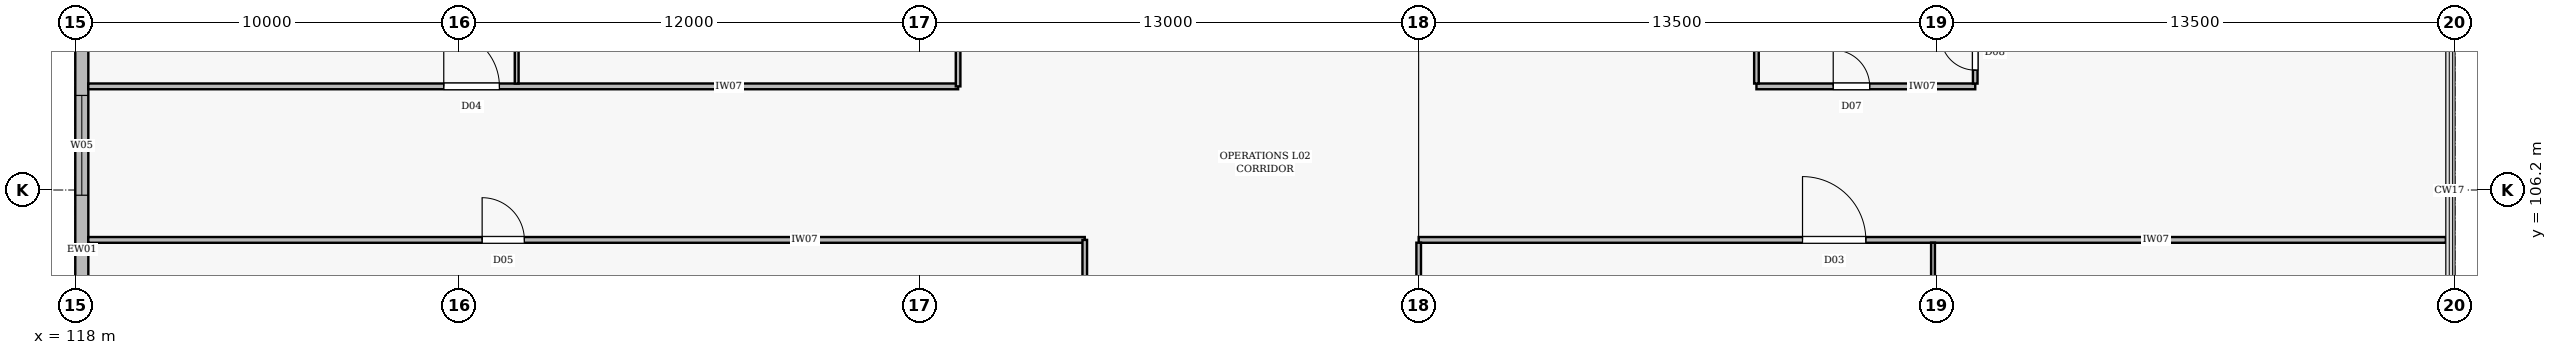
"""IFC4 building model, lengths in metres.
Left out: names, types, materials, properties, quantities, classifications, styles, units other than length and angle.
Written with IfcOpenShell. Run it as: python <this file> out.ifc"""

import sys

from ifc_helpers import new_model, si_unit, direction, frame, frame_2d, origin, place, context, subcontext, project, spatial, rectangle, extrude, element, fill, save


model = new_model("IFC4")
c1 = context("Model", 3, precision=1e-05, world=origin(), true_north=direction((0.0, 1.0)))
c2 = subcontext(c1, "Body", "Model", "MODEL_VIEW")
j1 = project(units=[si_unit("LENGTHUNIT", "METRE"), si_unit("PLANEANGLEUNIT", "RADIAN")], contexts=[c1])
p1 = place(None, origin())
s1 = spatial("IfcSite", under=j1, at=p1, CompositionType="ELEMENT")
p2 = place(p1, origin())
s2 = spatial("IfcBuilding", under=s1, at=p2, CompositionType="ELEMENT")
p3 = place(p2, frame((0.0, 0.0, 12.6)))
s3 = spatial("IfcBuildingStorey", under=s2, at=p3, CompositionType="ELEMENT", Elevation=12.6)
p4 = place(p3, frame((118.17, 101.073, 0.0), z_axis=(0.0, 0.0, 1.0), x_axis=(0.0, 1.0, 0.0)))
e1 = element("IfcWall", 1, at=p4, inside=s3, PredefinedType="STANDARD", context=c2, shape_type="SweptSolid", body=[
    extrude(rectangle(XDim=10.254, YDim=0.34, at=frame_2d((5.127, 0.0))), origin(), (0.0, 0.0, 1.0), 3.9),
])
p5 = place(p4, frame((0.964, 0.0, 0.75)))
e2 = element("IfcOpeningElement", 2, at=p5, cuts=e1, PredefinedType="OPENING", context=c2, shape_type="SweptSolid", body=[
    extrude(rectangle(XDim=1.2, YDim=1.8, at=frame_2d((0.6, 0.9))), frame((0.0, 0.182, 0.0), z_axis=(0.0, -1.0, 0.0), x_axis=(1.0, 0.0, 0.0)), (0.0, 0.0, 1.0), 0.364),
])
p6 = place(p4, frame((4.991, 0.0, 0.75)))
e3 = element("IfcOpeningElement", 3, at=p6, cuts=e1, PredefinedType="OPENING", context=c2, shape_type="SweptSolid", body=[
    extrude(rectangle(XDim=2.6, YDim=2.4, at=frame_2d((1.3, 1.2))), frame((0.0, 0.182, 0.0), z_axis=(0.0, -1.0, 0.0), x_axis=(1.0, 0.0, 0.0)), (0.0, 0.0, 1.0), 0.364),
])
p7 = place(p3, frame((118.338, 104.9, 0.0), z_axis=(0.0, 0.0, 1.0), x_axis=(1.0, 0.0, 0.0)))
e4 = element("IfcWall", 4, at=p7, inside=s3, PredefinedType="PARTITIONING", context=c2, shape_type="SweptSolid", body=[
    extrude(rectangle(XDim=25.962, YDim=0.15, at=frame_2d((12.981, 0.0))), origin(), (0.0, 0.0, 1.0), 4.09),
])
p8 = place(p7, frame((10.262, 0.0, 0.005)))
e5 = element("IfcOpeningElement", 5, at=p8, cuts=e4, PredefinedType="OPENING", context=c2, shape_type="SweptSolid", body=[
    extrude(rectangle(XDim=1.1, YDim=2.1, at=frame_2d((0.55, 1.05))), frame((0.0, 0.087, 0.0), z_axis=(0.0, -1.0, 0.0), x_axis=(1.0, 0.0, 0.0)), (0.0, 0.0, 1.0), 0.174),
])
p9 = place(p3, frame((153.0, 104.9, 0.0), z_axis=(0.0, 0.0, 1.0), x_axis=(1.0, 0.0, 0.0)))
e6 = element("IfcWall", 6, at=p9, inside=s3, PredefinedType="PARTITIONING", context=c2, shape_type="SweptSolid", body=[
    extrude(rectangle(XDim=26.762, YDim=0.15, at=frame_2d((13.381, 0.0))), origin(), (0.0, 0.0, 1.0), 4.09),
])
p10 = place(p9, frame((10.0, 0.0, 0.005)))
e7 = element("IfcOpeningElement", 7, at=p10, cuts=e6, PredefinedType="OPENING", context=c2, shape_type="SweptSolid", body=[
    extrude(rectangle(XDim=1.65, YDim=2.2, at=frame_2d((0.825, 1.1))), frame((0.0, 0.087, 0.0), z_axis=(0.0, -1.0, 0.0), x_axis=(1.0, 0.0, 0.0)), (0.0, 0.0, 1.0), 0.174),
])
p11 = place(p3, frame((144.3, 93.5, 0.0), z_axis=(0.0, 0.0, 1.0), x_axis=(0.0, 1.0, 0.0)))
e8 = element("IfcWall", 8, at=p11, inside=s3, PredefinedType="PARTITIONING", context=c2, shape_type="SweptSolid", body=[
    extrude(rectangle(XDim=11.4, YDim=0.12, at=frame_2d((5.7, 0.0))), origin(), (0.0, 0.0, 1.0), 3.99),
])
p12 = place(p11, frame((4.5, 0.0, 0.005)))
e9 = element("IfcOpeningElement", 9, at=p12, cuts=e8, PredefinedType="OPENING", context=c2, shape_type="SweptSolid", body=[
    extrude(rectangle(XDim=0.95, YDim=2.1, at=frame_2d((0.475, 1.05))), frame((0.0, 0.072, 0.0), z_axis=(0.0, -1.0, 0.0), x_axis=(1.0, 0.0, 0.0)), (0.0, 0.0, 1.0), 0.144),
])
p13 = place(p3, frame((153.0, 100.8, 0.0), z_axis=(0.0, 0.0, 1.0), x_axis=(0.0, 1.0, 0.0)))
e10 = element("IfcWall", 10, at=p13, inside=s3, PredefinedType="PARTITIONING", context=c2, shape_type="SweptSolid", body=[
    extrude(rectangle(XDim=4.027, YDim=0.12, at=frame_2d((2.013, 0.0))), origin(), (0.0, 0.0, 1.0), 3.99),
])
p14 = place(p13, frame((1.539, 0.0, 0.005)))
e11 = element("IfcOpeningElement", 11, at=p14, cuts=e10, PredefinedType="OPENING", context=c2, shape_type="SweptSolid", body=[
    extrude(rectangle(XDim=0.95, YDim=2.1, at=frame_2d((0.475, 1.05))), frame((0.0, 0.072, 0.0), z_axis=(0.0, -1.0, 0.0), x_axis=(1.0, 0.0, 0.0)), (0.0, 0.0, 1.0), 0.144),
])
p15 = place(p3, frame((118.338, 108.9, 0.0), z_axis=(0.0, 0.0, 1.0), x_axis=(1.0, 0.0, 0.0)))
e12 = element("IfcWall", 12, at=p15, inside=s3, PredefinedType="PARTITIONING", context=c2, shape_type="SweptSolid", body=[
    extrude(rectangle(XDim=22.662, YDim=0.15, at=frame_2d((11.331, 0.0))), origin(), (0.0, 0.0, 1.0), 4.09),
])
p16 = place(p15, frame((9.262, 0.0, 0.005)))
e13 = element("IfcOpeningElement", 13, at=p16, cuts=e12, PredefinedType="OPENING", context=c2, shape_type="SweptSolid", body=[
    extrude(rectangle(XDim=1.45, YDim=2.15, at=frame_2d((0.725, 1.075))), frame((0.0, 0.087, 0.0), z_axis=(0.0, -1.0, 0.0), x_axis=(1.0, 0.0, 0.0)), (0.0, 0.0, 1.0), 0.174),
])
p17 = place(p3, frame((141.0, 108.9, 0.0), z_axis=(0.0, 0.0, 1.0), x_axis=(0.0, 1.0, 0.0)))
e14 = element("IfcWall", 14, at=p17, inside=s3, PredefinedType="PARTITIONING", context=c2, shape_type="SweptSolid", body=[
    extrude(rectangle(XDim=3.4, YDim=0.12, at=frame_2d((1.7, 0.0))), origin(), (0.0, 0.0, 1.0), 3.99),
])
p18 = place(p3, frame((161.8, 108.9, 0.0), z_axis=(0.0, 0.0, 1.0), x_axis=(1.0, 0.0, 0.0)))
e15 = element("IfcWall", 15, at=p18, inside=s3, PredefinedType="PARTITIONING", context=c2, shape_type="SweptSolid", body=[
    extrude(rectangle(XDim=5.7, YDim=0.15, at=frame_2d((2.85, 0.0))), origin(), (0.0, 0.0, 1.0), 4.09),
])
p19 = place(p18, frame((2.0, 0.0, 0.005)))
e16 = element("IfcOpeningElement", 16, at=p19, cuts=e15, PredefinedType="OPENING", context=c2, shape_type="SweptSolid", body=[
    extrude(rectangle(XDim=0.95, YDim=2.1, at=frame_2d((0.475, 1.05))), frame((0.0, 0.087, 0.0), z_axis=(0.0, -1.0, 0.0), x_axis=(1.0, 0.0, 0.0)), (0.0, 0.0, 1.0), 0.174),
])
p20 = place(p3, frame((167.5, 108.973, 0.0), z_axis=(0.0, 0.0, 1.0), x_axis=(0.0, 1.0, 0.0)))
e17 = element("IfcWall", 17, at=p20, inside=s3, PredefinedType="PARTITIONING", context=c2, shape_type="SweptSolid", body=[
    extrude(rectangle(XDim=6.427, YDim=0.12, at=frame_2d((3.213, 0.0))), origin(), (0.0, 0.0, 1.0), 3.99),
])
p21 = place(p20, frame((0.35, 0.0, 0.005)))
e18 = element("IfcOpeningElement", 18, at=p21, cuts=e17, PredefinedType="OPENING", context=c2, shape_type="SweptSolid", body=[
    extrude(rectangle(XDim=0.9, YDim=2.1, at=frame_2d((0.45, 1.05))), frame((0.0, 0.072, 0.0), z_axis=(0.0, -1.0, 0.0), x_axis=(1.0, 0.0, 0.0)), (0.0, 0.0, 1.0), 0.144),
])
p22 = place(p3, frame((161.8, 108.973, 0.0), z_axis=(0.0, 0.0, 1.0), x_axis=(0.0, 1.0, 0.0)))
e19 = element("IfcWall", 19, at=p22, inside=s3, PredefinedType="PARTITIONING", context=c2, shape_type="SweptSolid", body=[
    extrude(rectangle(XDim=13.189, YDim=0.12, at=frame_2d((6.595, 0.0))), origin(), (0.0, 0.0, 1.0), 3.99),
])
p23 = place(p3, frame((166.4, 79.478, 0.0), z_axis=(0.0, 0.0, 1.0), x_axis=(0.0, 1.0, 0.0)))
e20 = element("IfcWall", 20, at=p23, inside=s3, PredefinedType="MOVABLE", context=c2, shape_type="SweptSolid", body=[
    extrude(rectangle(XDim=25.349, YDim=0.1, at=frame_2d((12.674, 0.0))), origin(), (0.0, 0.0, 1.0), 3.99),
])
p24 = place(p3, frame((129.5, 108.973, 0.0), z_axis=(0.0, 0.0, 1.0), x_axis=(0.0, 1.0, 0.0)))
e21 = element("IfcWall", 21, at=p24, inside=s3, PredefinedType="MOVABLE", context=c2, shape_type="SweptSolid", body=[
    extrude(rectangle(XDim=13.189, YDim=0.1, at=frame_2d((6.595, 0.0))), origin(), (0.0, 0.0, 1.0), 4.09),
])
p25 = place(p6, origin())
e22 = element("IfcWindow", 22, at=p25, inside=s3, PartitioningType="DOUBLE_PANEL_VERTICAL", PredefinedType="WINDOW", context=c2, shape_type="SweptSolid", body=[
    extrude(rectangle(XDim=2.6, YDim=2.4, at=frame_2d((1.3, 1.2))), frame((0.0, 0.03, 0.0), z_axis=(0.0, -1.0, 0.0), x_axis=(1.0, 0.0, 0.0)), (0.0, 0.0, 1.0), 0.06),
])
fill(e3, e22)
p26 = place(p8, origin())
e23 = element("IfcDoor", 23, at=p26, inside=s3, OperationType="SINGLE_SWING_LEFT", PredefinedType="DOOR", context=c2, shape_type="SweptSolid", body=[
    extrude(rectangle(XDim=1.1, YDim=2.1, at=frame_2d((0.55, 1.05))), frame((0.0, 0.025, 0.0), z_axis=(0.0, -1.0, 0.0), x_axis=(1.0, 0.0, 0.0)), (0.0, 0.0, 1.0), 0.05),
])
fill(e5, e23)
p27 = place(p10, origin())
e24 = element("IfcDoor", 24, at=p27, inside=s3, OperationType="DOUBLE_DOOR_SINGLE_SWING", PredefinedType="DOOR", context=c2, shape_type="SweptSolid", body=[
    extrude(rectangle(XDim=1.65, YDim=2.2, at=frame_2d((0.825, 1.1))), frame((0.0, 0.025, 0.0), z_axis=(0.0, -1.0, 0.0), x_axis=(1.0, 0.0, 0.0)), (0.0, 0.0, 1.0), 0.05),
])
fill(e7, e24)
p28 = place(p16, origin())
e25 = element("IfcDoor", 25, at=p28, inside=s3, OperationType="DOUBLE_DOOR_SINGLE_SWING", PredefinedType="DOOR", context=c2, shape_type="SweptSolid", body=[
    extrude(rectangle(XDim=1.45, YDim=2.15, at=frame_2d((0.725, 1.075))), frame((0.0, 0.025, 0.0), z_axis=(0.0, -1.0, 0.0), x_axis=(1.0, 0.0, 0.0)), (0.0, 0.0, 1.0), 0.05),
])
fill(e13, e25)
p29 = place(p19, origin())
e26 = element("IfcDoor", 26, at=p29, inside=s3, OperationType="SINGLE_SWING_LEFT", PredefinedType="DOOR", context=c2, shape_type="SweptSolid", body=[
    extrude(rectangle(XDim=0.95, YDim=2.1, at=frame_2d((0.475, 1.05))), frame((0.0, 0.025, 0.0), z_axis=(0.0, -1.0, 0.0), x_axis=(1.0, 0.0, 0.0)), (0.0, 0.0, 1.0), 0.05),
])
fill(e16, e26)
p30 = place(p21, origin())
e27 = element("IfcDoor", 27, at=p30, inside=s3, OperationType="SINGLE_SWING_RIGHT", PredefinedType="DOOR", context=c2, shape_type="SweptSolid", body=[
    extrude(rectangle(XDim=0.9, YDim=2.1, at=frame_2d((0.45, 1.05))), frame((0.0, 0.025, 0.0), z_axis=(0.0, -1.0, 0.0), x_axis=(1.0, 0.0, 0.0)), (0.0, 0.0, 1.0), 0.05),
])
fill(e18, e27)
save(model, sys.argv[1])
